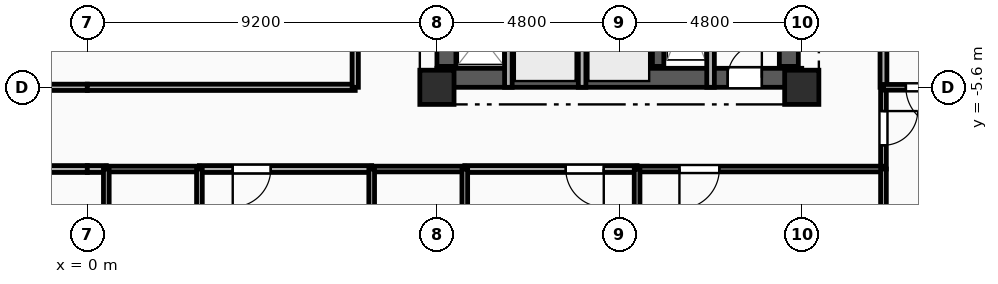
"""IFC4 building model, lengths in metres.
Left out: names, types, materials, properties, quantities, classifications, styles, units other than length and angle.
Written with IfcOpenShell. Run it as: python <this file> out.ifc"""

import sys

from ifc_helpers import new_model, si_unit, direction, frame, frame_2d, origin, origin_2d, place, context, subcontext, project, spatial, rectangle, extrude, element, fill, save


model = new_model("IFC4")
c1 = context("Model", 3, precision=1e-05, world=origin(), true_north=direction((0.0, 1.0)))
c2 = subcontext(c1, "Body", "Model", "MODEL_VIEW")
j1 = project(units=[si_unit("LENGTHUNIT", "METRE"), si_unit("PLANEANGLEUNIT", "RADIAN")], contexts=[c1])
p1 = place(None, origin())
s1 = spatial("IfcSite", under=j1, at=p1, CompositionType="ELEMENT")
p2 = place(p1, origin())
s2 = spatial("IfcBuilding", under=s1, at=p2, CompositionType="ELEMENT")
p3 = place(p2, frame((0.0, 0.0, 157.8)))
s3 = spatial("IfcBuildingStorey", under=s2, at=p3, CompositionType="ELEMENT", Elevation=157.8)
for number, where, z_axis, x_axis in (
    (1, (9.2, -5.6, 0.0), (0.0, 0.0, 1.0), (1.0, 0.0, 0.0)),
    (2, (18.8, -5.6, 0.0), (0.0, 0.0, 1.0), (1.0, 0.0, 0.0)),
):
    element("IfcColumn", number, at=place(p3, frame(where, z_axis=z_axis, x_axis=x_axis)), inside=s3, PredefinedType="COLUMN", context=c2, shape_type="SweptSolid", body=[
        extrude(rectangle(XDim=0.9, YDim=0.9, at=origin_2d()), origin(), (0.0, 0.0, 1.0), 3.35),
    ])
p4 = place(p3, frame((9.2, -5.35, 0.0), z_axis=(0.0, 0.0, 1.0), x_axis=(1.0, 0.0, 0.0)))
e3 = element("IfcWall", 3, at=p4, inside=s3, PredefinedType="SHEAR", context=c2, shape_type="SweptSolid", body=[
    extrude(rectangle(XDim=9.6, YDim=0.5, at=frame_2d((4.8, 0.0))), origin(), (0.0, 0.0, 1.0), 3.04),
])
p5 = place(p4, frame((7.65, 0.0, 0.0)))
e4 = element("IfcOpeningElement", 4, at=p5, cuts=e3, PredefinedType="OPENING", context=c2, shape_type="SweptSolid", body=[
    extrude(rectangle(XDim=0.9, YDim=2.1, at=frame_2d((0.45, 1.05))), frame((0.0, 0.26, 0.0), z_axis=(0.0, -1.0, 0.0), x_axis=(1.0, 0.0, 0.0)), (0.0, 0.0, 1.0), 0.52),
])
p6 = place(p3, frame((9.45, -5.05, 0.0), z_axis=(0.0, 0.0, 1.0), x_axis=(0.0, 1.0, 0.0)))
e5 = element("IfcWall", 5, at=p6, inside=s3, PredefinedType="SHEAR", context=c2, shape_type="SweptSolid", body=[
    extrude(rectangle(XDim=10.1, YDim=0.5, at=frame_2d((5.05, 0.0))), origin(), (0.0, 0.0, 1.0), 3.04),
])
p7 = place(p6, frame((7.15, 0.0, 0.0)))
e6 = element("IfcOpeningElement", 6, at=p7, cuts=e5, PredefinedType="OPENING", context=c2, shape_type="SweptSolid", body=[
    extrude(rectangle(XDim=0.9, YDim=2.1, at=frame_2d((0.45, 1.05))), frame((0.0, 0.26, 0.0), z_axis=(0.0, -1.0, 0.0), x_axis=(1.0, 0.0, 0.0)), (0.0, 0.0, 1.0), 0.52),
])
p8 = place(p6, frame((2.4, 0.0, 0.0)))
e7 = element("IfcOpeningElement", 7, at=p8, cuts=e5, PredefinedType="OPENING", context=c2, shape_type="SweptSolid", body=[
    extrude(rectangle(XDim=1.2, YDim=2.15, at=frame_2d((0.6, 1.075))), frame((0.0, 0.26, 0.0), z_axis=(0.0, -1.0, 0.0), x_axis=(1.0, 0.0, 0.0)), (0.0, 0.0, 1.0), 0.52),
])
p9 = place(p3, frame((18.46, -5.05, 0.0), z_axis=(0.0, 0.0, 1.0), x_axis=(0.0, 1.0, 0.0)))
e8 = element("IfcWall", 8, at=p9, inside=s3, PredefinedType="SHEAR", context=c2, shape_type="SweptSolid", body=[
    extrude(rectangle(XDim=10.1, YDim=0.5, at=frame_2d((5.05, 0.0))), origin(), (0.0, 0.0, 1.0), 3.04),
])
p10 = place(p3, frame((15.02, -5.05, 0.0), z_axis=(0.0, 0.0, 1.0), x_axis=(0.0, 1.0, 0.0)))
e9 = element("IfcWall", 9, at=p10, inside=s3, PredefinedType="SHEAR", context=c2, shape_type="SweptSolid", body=[
    extrude(rectangle(XDim=10.1, YDim=0.3, at=frame_2d((5.05, 0.0))), origin(), (0.0, 0.0, 1.0), 3.04),
])
p11 = place(p3, frame((16.4, -2.11, 0.0), z_axis=(0.0, 0.0, 1.0), x_axis=(0.0, -1.0, 0.0)))
e10 = element("IfcWall", 10, at=p11, inside=s3, PredefinedType="PARTITIONING", context=c2, shape_type="SweptSolid", body=[
    extrude(rectangle(XDim=3.49, YDim=0.2, at=frame_2d((1.745, 0.0))), origin(), (0.0, 0.0, 1.0), 3.04),
])
for number, where, z_axis, x_axis in (
    (11, (11.08, -5.6, 0.0), (0.0, 0.0, 1.0), (0.0, 1.0, 0.0)),
    (12, (13.02, -5.6, 0.0), (0.0, 0.0, 1.0), (0.0, 1.0, 0.0)),
):
    element("IfcWall", number, at=place(p3, frame(where, z_axis=z_axis, x_axis=x_axis)), inside=s3, PredefinedType="PARTITIONING", context=c2, shape_type="SweptSolid", body=[
        extrude(rectangle(XDim=2.25, YDim=0.2, at=frame_2d((1.125, 0.0))), origin(), (0.0, 0.0, 1.0), 3.04),
    ])
p12 = place(p3, frame((0.0, -7.75, 0.0), z_axis=(0.0, 0.0, 1.0), x_axis=(-1.0, 0.0, 0.0)))
e13 = element("IfcWall", 13, at=p12, inside=s3, PredefinedType="PARTITIONING", context=c2, shape_type="SweptSolid", body=[
    extrude(rectangle(XDim=4.033, YDim=0.18, at=frame_2d((2.017, 0.0))), origin(), (0.0, 0.0, 1.0), 3.04),
])
p13 = place(p12, frame((1.517, 0.0, 0.0)))
e14 = element("IfcOpeningElement", 14, at=p13, cuts=e13, PredefinedType="OPENING", context=c2, shape_type="SweptSolid", body=[
    extrude(rectangle(XDim=1.0, YDim=2.15, at=frame_2d((0.5, 1.075))), frame((0.0, 0.1, 0.0), z_axis=(0.0, -1.0, 0.0), x_axis=(1.0, 0.0, 0.0)), (0.0, 0.0, 1.0), 0.2),
])
p14 = place(p3, frame((-7.05, -5.6, 0.0), z_axis=(0.0, 0.0, 1.0), x_axis=(1.0, 0.0, 0.0)))
e15 = element("IfcWall", 15, at=p14, inside=s3, PredefinedType="PARTITIONING", context=c2, shape_type="SweptSolid", body=[
    extrude(rectangle(XDim=7.05, YDim=0.165, at=frame_2d((3.525, 0.0))), origin(), (0.0, 0.0, 1.0), 2.525),
])
p15 = place(p3, frame((20.95, -5.6, 0.0), z_axis=(0.0, 0.0, 1.0), x_axis=(0.0, -1.0, 0.0)))
e16 = element("IfcWall", 16, at=p15, inside=s3, PredefinedType="PARTITIONING", context=c2, shape_type="SweptSolid", body=[
    extrude(rectangle(XDim=2.15, YDim=0.15, at=frame_2d((1.075, 0.0))), origin(), (0.0, 0.0, 1.0), 3.04),
])
p16 = place(p15, frame((0.625, 0.0, 0.0)))
e17 = element("IfcOpeningElement", 17, at=p16, cuts=e16, PredefinedType="OPENING", context=c2, shape_type="SweptSolid", body=[
    extrude(rectangle(XDim=0.9, YDim=2.1, at=frame_2d((0.45, 1.05))), frame((0.0, 0.085, 0.0), z_axis=(0.0, -1.0, 0.0), x_axis=(1.0, 0.0, 0.0)), (0.0, 0.0, 1.0), 0.17),
])
p17 = place(p3, frame((0.5, -7.75, 0.0), z_axis=(0.0, 0.0, 1.0), x_axis=(-1.0, 0.0, 0.0)))
e18 = element("IfcWall", 18, at=p17, inside=s3, PredefinedType="PARTITIONING", context=c2, shape_type="SweptSolid", body=[
    extrude(rectangle(XDim=0.5, YDim=0.18, at=frame_2d((0.25, 0.0))), origin(), (0.0, 0.0, 1.0), 3.04),
])
p18 = place(p3, frame((7.483, -7.75, 0.0), z_axis=(0.0, 0.0, 1.0), x_axis=(-1.0, 0.0, 0.0)))
e19 = element("IfcWall", 19, at=p18, inside=s3, PredefinedType="PARTITIONING", context=c2, shape_type="SweptSolid", body=[
    extrude(rectangle(XDim=4.533, YDim=0.18, at=frame_2d((2.267, 0.0))), origin(), (0.0, 0.0, 1.0), 3.04),
])
p19 = place(p18, frame((2.656, 0.0, 0.0)))
e20 = element("IfcOpeningElement", 20, at=p19, cuts=e19, PredefinedType="OPENING", context=c2, shape_type="SweptSolid", body=[
    extrude(rectangle(XDim=1.0, YDim=2.15, at=frame_2d((0.5, 1.075))), frame((0.0, 0.1, 0.0), z_axis=(0.0, -1.0, 0.0), x_axis=(1.0, 0.0, 0.0)), (0.0, 0.0, 1.0), 0.2),
])
p20 = place(p3, frame((2.95, -7.75, 0.0), z_axis=(0.0, 0.0, 1.0), x_axis=(-1.0, 0.0, 0.0)))
e21 = element("IfcWall", 21, at=p20, inside=s3, PredefinedType="PLUMBINGWALL", context=c2, shape_type="SweptSolid", body=[
    extrude(rectangle(XDim=2.45, YDim=0.15, at=frame_2d((1.225, 0.0))), origin(), (0.0, 0.0, 1.0), 3.04),
])
p21 = place(p3, frame((14.467, -7.75, 0.0), z_axis=(0.0, 0.0, 1.0), x_axis=(-1.0, 0.0, 0.0)))
e22 = element("IfcWall", 22, at=p21, inside=s3, PredefinedType="PARTITIONING", context=c2, shape_type="SweptSolid", body=[
    extrude(rectangle(XDim=4.534, YDim=0.18, at=frame_2d((2.267, 0.0))), origin(), (0.0, 0.0, 1.0), 3.04),
])
p22 = place(p21, frame((0.877, 0.0, 0.0)))
e23 = element("IfcOpeningElement", 23, at=p22, cuts=e22, PredefinedType="OPENING", context=c2, shape_type="SweptSolid", body=[
    extrude(rectangle(XDim=1.0, YDim=2.15, at=frame_2d((0.5, 1.075))), frame((0.0, 0.1, 0.0), z_axis=(0.0, -1.0, 0.0), x_axis=(1.0, 0.0, 0.0)), (0.0, 0.0, 1.0), 0.2),
])
p23 = place(p3, frame((9.933, -7.75, 0.0), z_axis=(0.0, 0.0, 1.0), x_axis=(-1.0, 0.0, 0.0)))
e24 = element("IfcWall", 24, at=p23, inside=s3, PredefinedType="PLUMBINGWALL", context=c2, shape_type="SweptSolid", body=[
    extrude(rectangle(XDim=2.45, YDim=0.15, at=frame_2d((1.225, 0.0))), origin(), (0.0, 0.0, 1.0), 3.04),
])
p24 = place(p3, frame((20.95, -7.75, 0.0), z_axis=(0.0, 0.0, 1.0), x_axis=(-1.0, 0.0, 0.0)))
e25 = element("IfcWall", 25, at=p24, inside=s3, PredefinedType="PARTITIONING", context=c2, shape_type="SweptSolid", body=[
    extrude(rectangle(XDim=6.483, YDim=0.15, at=frame_2d((3.241, 0.0))), origin(), (0.0, 0.0, 1.0), 3.04),
])
p25 = place(p24, frame((4.319, 0.0, 0.0)))
e26 = element("IfcOpeningElement", 26, at=p25, cuts=e25, PredefinedType="OPENING", context=c2, shape_type="SweptSolid", body=[
    extrude(rectangle(XDim=1.05, YDim=2.15, at=frame_2d((0.525, 1.075))), frame((0.0, 0.085, 0.0), z_axis=(0.0, -1.0, 0.0), x_axis=(1.0, 0.0, 0.0)), (0.0, 0.0, 1.0), 0.17),
])
p26 = place(p3, frame((0.0, -5.6, 0.0), z_axis=(0.0, 0.0, 1.0), x_axis=(1.0, 0.0, 0.0)))
e27 = element("IfcWall", 27, at=p26, inside=s3, PredefinedType="PARTITIONING", context=c2, shape_type="SweptSolid", body=[
    extrude(rectangle(XDim=7.05, YDim=0.165, at=frame_2d((3.525, 0.0))), origin(), (0.0, 0.0, 1.0), 2.525),
])
p27 = place(p3, frame((20.95, 8.5, 0.0), z_axis=(0.0, 0.0, 1.0), x_axis=(0.0, -1.0, 0.0)))
e28 = element("IfcWall", 28, at=p27, inside=s3, PredefinedType="PARTITIONING", context=c2, shape_type="SweptSolid", body=[
    extrude(rectangle(XDim=14.1, YDim=0.18, at=frame_2d((7.05, 0.0))), origin(), (0.0, 0.0, 1.0), 3.04),
])
p28 = place(p27, frame((8.042, 0.0, 0.0)))
e29 = element("IfcOpeningElement", 29, at=p28, cuts=e28, PredefinedType="OPENING", context=c2, shape_type="SweptSolid", body=[
    extrude(rectangle(XDim=1.0, YDim=2.15, at=frame_2d((0.5, 1.075))), frame((0.0, 0.1, 0.0), z_axis=(0.0, -1.0, 0.0), x_axis=(1.0, 0.0, 0.0)), (0.0, 0.0, 1.0), 0.2),
])
p29 = place(p3, frame((7.05, -5.6, 0.0), z_axis=(0.0, 0.0, 1.0), x_axis=(0.0, 1.0, 0.0)))
e30 = element("IfcWall", 30, at=p29, inside=s3, PredefinedType="PARTITIONING", context=c2, shape_type="SweptSolid", body=[
    extrude(rectangle(XDim=2.65, YDim=0.165, at=frame_2d((1.325, 0.0))), origin(), (0.0, 0.0, 1.0), 3.04),
])
p30 = place(p3, frame((23.18, -5.6, 0.0), z_axis=(0.0, 0.0, 1.0), x_axis=(-1.0, 0.0, 0.0)))
e31 = element("IfcWall", 31, at=p30, inside=s3, PredefinedType="PARTITIONING", context=c2, shape_type="SweptSolid", body=[
    extrude(rectangle(XDim=2.23, YDim=0.15, at=frame_2d((1.115, 0.0))), origin(), (0.0, 0.0, 1.0), 3.04),
])
p31 = place(p30, frame((0.59, 0.0, 0.0)))
e32 = element("IfcOpeningElement", 32, at=p31, cuts=e31, PredefinedType="OPENING", context=c2, shape_type="SweptSolid", body=[
    extrude(rectangle(XDim=1.05, YDim=2.15, at=frame_2d((0.525, 1.075))), frame((0.0, 0.085, 0.0), z_axis=(0.0, -1.0, 0.0), x_axis=(1.0, 0.0, 0.0)), (0.0, 0.0, 1.0), 0.17),
])
p32 = place(p3, frame((20.95, -15.6, 0.0), z_axis=(0.0, 0.0, 1.0), x_axis=(0.0, 1.0, 0.0)))
e33 = element("IfcWall", 33, at=p32, inside=s3, PredefinedType="PARTITIONING", context=c2, shape_type="SweptSolid", body=[
    extrude(rectangle(XDim=7.85, YDim=0.15, at=frame_2d((3.925, 0.0))), origin(), (0.0, 0.0, 1.0), 3.04),
])
for number, where, z_axis, x_axis in (
    (34, (0.5, -7.75, 0.0), (0.0, 0.0, 1.0), (0.0, -1.0, 0.0)),
    (35, (2.95, -9.9, 0.0), (0.0, 0.0, 1.0), (0.0, 1.0, 0.0)),
    (36, (7.483, -7.75, 0.0), (0.0, 0.0, 1.0), (0.0, -1.0, 0.0)),
    (37, (9.933, -9.9, 0.0), (0.0, 0.0, 1.0), (0.0, 1.0, 0.0)),
):
    element("IfcWall", number, at=place(p3, frame(where, z_axis=z_axis, x_axis=x_axis)), inside=s3, PredefinedType="PLUMBINGWALL", context=c2, shape_type="SweptSolid", body=[
        extrude(rectangle(XDim=2.15, YDim=0.15, at=frame_2d((1.075, 0.0))), origin(), (0.0, 0.0, 1.0), 3.04),
    ])
p33 = place(p3, frame((14.467, -7.75, 0.0), z_axis=(0.0, 0.0, 1.0), x_axis=(0.0, -1.0, 0.0)))
e38 = element("IfcWall", 38, at=p33, inside=s3, PredefinedType="PARTITIONING", context=c2, shape_type="SweptSolid", body=[
    extrude(rectangle(XDim=7.85, YDim=0.15, at=frame_2d((3.925, 0.0))), origin(), (0.0, 0.0, 1.0), 3.04),
])
p34 = place(p5, origin())
e39 = element("IfcDoor", 39, at=p34, inside=s3, OperationType="SINGLE_SWING_RIGHT", PredefinedType="DOOR", context=c2, shape_type="SweptSolid", body=[
    extrude(rectangle(XDim=0.9, YDim=2.1, at=frame_2d((0.45, 1.05))), frame((0.0, 0.025, 0.0), z_axis=(0.0, -1.0, 0.0), x_axis=(1.0, 0.0, 0.0)), (0.0, 0.0, 1.0), 0.05),
])
fill(e4, e39)
p35 = place(p16, origin())
e40 = element("IfcDoor", 40, at=p35, inside=s3, OperationType="SINGLE_SWING_LEFT", PredefinedType="DOOR", context=c2, shape_type="SweptSolid", body=[
    extrude(rectangle(XDim=0.9, YDim=2.1, at=frame_2d((0.45, 1.05))), frame((0.0, 0.025, 0.0), z_axis=(0.0, -1.0, 0.0), x_axis=(1.0, 0.0, 0.0)), (0.0, 0.0, 1.0), 0.05),
])
fill(e17, e40)
p36 = place(p19, origin())
e41 = element("IfcDoor", 41, at=p36, inside=s3, OperationType="SINGLE_SWING_RIGHT", PredefinedType="DOOR", context=c2, shape_type="SweptSolid", body=[
    extrude(rectangle(XDim=1.0, YDim=2.15, at=frame_2d((0.5, 1.075))), frame((0.0, 0.025, 0.0), z_axis=(0.0, -1.0, 0.0), x_axis=(1.0, 0.0, 0.0)), (0.0, 0.0, 1.0), 0.05),
])
fill(e20, e41)
p37 = place(p22, origin())
e42 = element("IfcDoor", 42, at=p37, inside=s3, OperationType="SINGLE_SWING_LEFT", PredefinedType="DOOR", context=c2, shape_type="SweptSolid", body=[
    extrude(rectangle(XDim=1.0, YDim=2.15, at=frame_2d((0.5, 1.075))), frame((0.0, 0.025, 0.0), z_axis=(0.0, -1.0, 0.0), x_axis=(1.0, 0.0, 0.0)), (0.0, 0.0, 1.0), 0.05),
])
fill(e23, e42)
p38 = place(p25, origin())
e43 = element("IfcDoor", 43, at=p38, inside=s3, OperationType="SINGLE_SWING_RIGHT", PredefinedType="DOOR", context=c2, shape_type="SweptSolid", body=[
    extrude(rectangle(XDim=1.05, YDim=2.15, at=frame_2d((0.525, 1.075))), frame((0.0, 0.025, 0.0), z_axis=(0.0, -1.0, 0.0), x_axis=(1.0, 0.0, 0.0)), (0.0, 0.0, 1.0), 0.05),
])
fill(e26, e43)
p39 = place(p31, origin())
e44 = element("IfcDoor", 44, at=p39, inside=s3, OperationType="SINGLE_SWING_LEFT", PredefinedType="DOOR", context=c2, shape_type="SweptSolid", body=[
    extrude(rectangle(XDim=1.05, YDim=2.15, at=frame_2d((0.525, 1.075))), frame((0.0, 0.025, 0.0), z_axis=(0.0, -1.0, 0.0), x_axis=(1.0, 0.0, 0.0)), (0.0, 0.0, 1.0), 0.05),
])
fill(e32, e44)
save(model, sys.argv[1])
